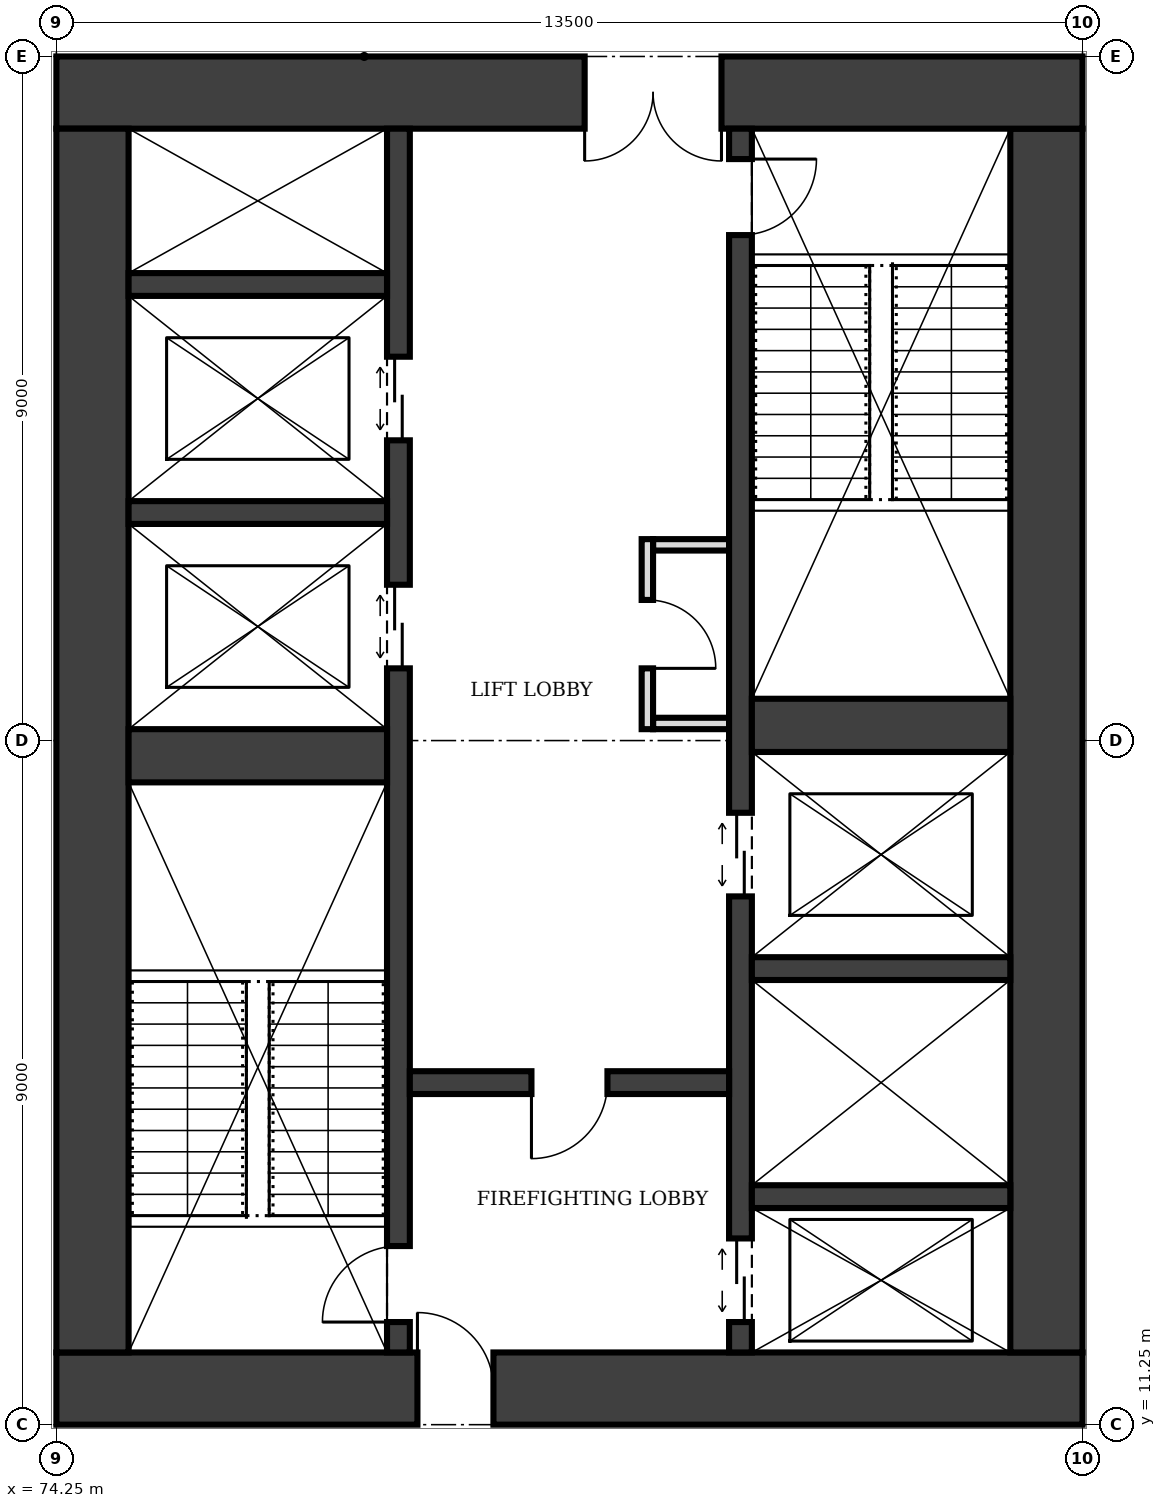
"""IFC4 building model, lengths in metres.
Left out: names, types, materials, properties, quantities, classifications, styles, units other than length and angle.
Written with IfcOpenShell. Run it as: python <this file> out.ifc"""

import sys

from ifc_helpers import new_model, si_unit, direction, frame, frame_2d, origin, place, context, subcontext, project, spatial, rectangle, extrude, element, fill, save


model = new_model("IFC4")
c1 = context("Model", 3, precision=1e-05, world=origin(), true_north=direction((0.0, 1.0)))
c2 = subcontext(c1, "Body", "Model", "MODEL_VIEW")
j1 = project(units=[si_unit("LENGTHUNIT", "METRE"), si_unit("PLANEANGLEUNIT", "RADIAN")], contexts=[c1])
p1 = place(None, origin())
s1 = spatial("IfcSite", under=j1, at=p1, CompositionType="ELEMENT")
p2 = place(p1, origin())
s2 = spatial("IfcBuilding", under=s1, at=p2, CompositionType="ELEMENT")
p3 = place(p2, frame((0.0, 0.0, 73.0)))
s3 = spatial("IfcBuildingStorey", under=s2, at=p3, CompositionType="ELEMENT", Elevation=73.0)
p4 = place(p3, frame((74.25, 11.725, 0.0), z_axis=(0.0, 0.0, 1.0), x_axis=(1.0, 0.0, 0.0)))
e1 = element("IfcWall", 1, at=p4, inside=s3, PredefinedType="SHEAR", context=c2, shape_type="SweptSolid", body=[
    extrude(rectangle(XDim=13.5, YDim=0.95, at=frame_2d((6.75, 0.0))), origin(), (0.0, 0.0, 1.0), 4.0),
])
p5 = place(p4, frame((4.75, 0.0, 0.0)))
e2 = element("IfcOpeningElement", 2, at=p5, cuts=e1, PredefinedType="OPENING", context=c2, shape_type="SweptSolid", body=[
    extrude(rectangle(XDim=1.0, YDim=2.1, at=frame_2d((0.5, 1.05))), frame((0.0, 0.485, 0.0), z_axis=(0.0, -1.0, 0.0), x_axis=(1.0, 0.0, 0.0)), (0.0, 0.0, 1.0), 0.97),
])
p6 = place(p3, frame((87.275, 12.2, 0.0), z_axis=(0.0, 0.0, 1.0), x_axis=(0.0, 1.0, 0.0)))
e3 = element("IfcWall", 3, at=p6, inside=s3, PredefinedType="SHEAR", context=c2, shape_type="SweptSolid", body=[
    extrude(rectangle(XDim=16.1, YDim=0.95, at=frame_2d((8.05, 0.0))), origin(), (0.0, 0.0, 1.0), 4.0),
])
p7 = place(p3, frame((87.75, 28.775, 0.0), z_axis=(0.0, 0.0, 1.0), x_axis=(-1.0, 0.0, 0.0)))
e4 = element("IfcWall", 4, at=p7, inside=s3, PredefinedType="SHEAR", context=c2, shape_type="SweptSolid", body=[
    extrude(rectangle(XDim=13.5, YDim=0.95, at=frame_2d((6.75, 0.0))), origin(), (0.0, 0.0, 1.0), 4.0),
])
p8 = place(p7, frame((4.75, 0.0, 0.0)))
e5 = element("IfcOpeningElement", 5, at=p8, cuts=e4, PredefinedType="OPENING", context=c2, shape_type="SweptSolid", body=[
    extrude(rectangle(XDim=1.8, YDim=2.1, at=frame_2d((0.9, 1.05))), frame((0.0, 0.485, 0.0), z_axis=(0.0, -1.0, 0.0), x_axis=(1.0, 0.0, 0.0)), (0.0, 0.0, 1.0), 0.97),
])
p9 = place(p3, frame((74.725, 28.3, 0.0), z_axis=(0.0, 0.0, 1.0), x_axis=(0.0, -1.0, 0.0)))
e6 = element("IfcWall", 6, at=p9, inside=s3, PredefinedType="SHEAR", context=c2, shape_type="SweptSolid", body=[
    extrude(rectangle(XDim=16.1, YDim=0.95, at=frame_2d((8.05, 0.0))), origin(), (0.0, 0.0, 1.0), 4.0),
])
p10 = place(p3, frame((78.75, 12.2, 0.0), z_axis=(0.0, 0.0, 1.0), x_axis=(0.0, 1.0, 0.0)))
e7 = element("IfcWall", 7, at=p10, inside=s3, PredefinedType="SHEAR", context=c2, shape_type="SweptSolid", body=[
    extrude(rectangle(XDim=16.1, YDim=0.3, at=frame_2d((8.05, 0.0))), origin(), (0.0, 0.0, 1.0), 4.0),
])
p11 = place(p10, frame((0.4, 0.0, 0.0)))
e8 = element("IfcOpeningElement", 8, at=p11, cuts=e7, PredefinedType="OPENING", context=c2, shape_type="SweptSolid", body=[
    extrude(rectangle(XDim=1.0, YDim=2.1, at=frame_2d((0.5, 1.05))), frame((0.0, 0.16, 0.0), z_axis=(0.0, -1.0, 0.0), x_axis=(1.0, 0.0, 0.0)), (0.0, 0.0, 1.0), 0.32),
])
p12 = place(p10, frame((9.0, 0.0, 0.0)))
e9 = element("IfcOpeningElement", 9, at=p12, cuts=e7, PredefinedType="OPENING", context=c2, shape_type="SweptSolid", body=[
    extrude(rectangle(XDim=1.1, YDim=2.1, at=frame_2d((0.55, 1.05))), frame((0.0, 0.16, 0.0), z_axis=(0.0, -1.0, 0.0), x_axis=(1.0, 0.0, 0.0)), (0.0, 0.0, 1.0), 0.32),
])
p13 = place(p10, frame((12.0, 0.0, 0.0)))
e10 = element("IfcOpeningElement", 10, at=p13, cuts=e7, PredefinedType="OPENING", context=c2, shape_type="SweptSolid", body=[
    extrude(rectangle(XDim=1.1, YDim=2.1, at=frame_2d((0.55, 1.05))), frame((0.0, 0.16, 0.0), z_axis=(0.0, -1.0, 0.0), x_axis=(1.0, 0.0, 0.0)), (0.0, 0.0, 1.0), 0.32),
])
p14 = place(p3, frame((83.25, 12.2, 0.0), z_axis=(0.0, 0.0, 1.0), x_axis=(0.0, 1.0, 0.0)))
e11 = element("IfcWall", 11, at=p14, inside=s3, PredefinedType="SHEAR", context=c2, shape_type="SweptSolid", body=[
    extrude(rectangle(XDim=16.1, YDim=0.3, at=frame_2d((8.05, 0.0))), origin(), (0.0, 0.0, 1.0), 4.0),
])
p15 = place(p14, frame((14.7, 0.0, 0.0)))
e12 = element("IfcOpeningElement", 12, at=p15, cuts=e11, PredefinedType="OPENING", context=c2, shape_type="SweptSolid", body=[
    extrude(rectangle(XDim=1.0, YDim=2.1, at=frame_2d((0.5, 1.05))), frame((0.0, 0.16, 0.0), z_axis=(0.0, -1.0, 0.0), x_axis=(1.0, 0.0, 0.0)), (0.0, 0.0, 1.0), 0.32),
])
p16 = place(p14, frame((0.4, 0.0, 0.0)))
e13 = element("IfcOpeningElement", 13, at=p16, cuts=e11, PredefinedType="OPENING", context=c2, shape_type="SweptSolid", body=[
    extrude(rectangle(XDim=1.1, YDim=2.1, at=frame_2d((0.55, 1.05))), frame((0.0, 0.16, 0.0), z_axis=(0.0, -1.0, 0.0), x_axis=(1.0, 0.0, 0.0)), (0.0, 0.0, 1.0), 0.32),
])
p17 = place(p14, frame((6.0, 0.0, 0.0)))
e14 = element("IfcOpeningElement", 14, at=p17, cuts=e11, PredefinedType="OPENING", context=c2, shape_type="SweptSolid", body=[
    extrude(rectangle(XDim=1.1, YDim=2.1, at=frame_2d((0.55, 1.05))), frame((0.0, 0.16, 0.0), z_axis=(0.0, -1.0, 0.0), x_axis=(1.0, 0.0, 0.0)), (0.0, 0.0, 1.0), 0.32),
])
p18 = place(p3, frame((75.2, 20.05, 0.0), z_axis=(0.0, 0.0, 1.0), x_axis=(1.0, 0.0, 0.0)))
e15 = element("IfcWall", 15, at=p18, inside=s3, PredefinedType="SHEAR", context=c2, shape_type="SweptSolid", body=[
    extrude(rectangle(XDim=3.4, YDim=0.7, at=frame_2d((1.7, 0.0))), origin(), (0.0, 0.0, 1.0), 4.0),
])
p19 = place(p3, frame((78.9, 15.75, 0.0), z_axis=(0.0, 0.0, 1.0), x_axis=(1.0, 0.0, 0.0)))
e16 = element("IfcWall", 16, at=p19, inside=s3, PredefinedType="SHEAR", context=c2, shape_type="SweptSolid", body=[
    extrude(rectangle(XDim=4.2, YDim=0.3, at=frame_2d((2.1, 0.0))), origin(), (0.0, 0.0, 1.0), 4.0),
])
p20 = place(p19, frame((1.6, 0.0, 0.0)))
e17 = element("IfcOpeningElement", 17, at=p20, cuts=e16, PredefinedType="OPENING", context=c2, shape_type="SweptSolid", body=[
    extrude(rectangle(XDim=1.0, YDim=2.1, at=frame_2d((0.5, 1.05))), frame((0.0, 0.16, 0.0), z_axis=(0.0, -1.0, 0.0), x_axis=(1.0, 0.0, 0.0)), (0.0, 0.0, 1.0), 0.32),
])
for number, where, z_axis, x_axis in (
    (18, (83.4, 14.25, 0.0), (0.0, 0.0, 1.0), (1.0, 0.0, 0.0)),
    (19, (83.4, 17.25, 0.0), (0.0, 0.0, 1.0), (1.0, 0.0, 0.0)),
):
    element("IfcWall", number, at=place(p3, frame(where, z_axis=z_axis, x_axis=x_axis)), inside=s3, PredefinedType="SHEAR", context=c2, shape_type="SweptSolid", body=[
        extrude(rectangle(XDim=3.4, YDim=0.3, at=frame_2d((1.7, 0.0))), origin(), (0.0, 0.0, 1.0), 4.0),
    ])
p21 = place(p3, frame((83.4, 20.45, 0.0), z_axis=(0.0, 0.0, 1.0), x_axis=(1.0, 0.0, 0.0)))
e20 = element("IfcWall", 20, at=p21, inside=s3, PredefinedType="SHEAR", context=c2, shape_type="SweptSolid", body=[
    extrude(rectangle(XDim=3.4, YDim=0.7, at=frame_2d((1.7, 0.0))), origin(), (0.0, 0.0, 1.0), 4.0),
])
for number, where, z_axis, x_axis in (
    (21, (75.2, 23.25, 0.0), (0.0, 0.0, 1.0), (1.0, 0.0, 0.0)),
    (22, (75.2, 26.25, 0.0), (0.0, 0.0, 1.0), (1.0, 0.0, 0.0)),
):
    element("IfcWall", number, at=place(p3, frame(where, z_axis=z_axis, x_axis=x_axis)), inside=s3, PredefinedType="SHEAR", context=c2, shape_type="SweptSolid", body=[
        extrude(rectangle(XDim=3.4, YDim=0.3, at=frame_2d((1.7, 0.0))), origin(), (0.0, 0.0, 1.0), 4.0),
    ])
p22 = place(p3, frame((82.025, 20.4, 0.0), z_axis=(0.0, 0.0, 1.0), x_axis=(0.0, 1.0, 0.0)))
e23 = element("IfcWall", 23, at=p22, inside=s3, PredefinedType="PARTITIONING", context=c2, shape_type="SweptSolid", body=[
    extrude(rectangle(XDim=2.5, YDim=0.15, at=frame_2d((1.25, 0.0))), origin(), (0.0, 0.0, 1.0), 3.75),
])
p23 = place(p22, frame((0.8, 0.0, 0.0)))
e24 = element("IfcOpeningElement", 24, at=p23, cuts=e23, PredefinedType="OPENING", context=c2, shape_type="SweptSolid", body=[
    extrude(rectangle(XDim=0.9, YDim=2.1, at=frame_2d((0.45, 1.05))), frame((0.0, 0.085, 0.0), z_axis=(0.0, -1.0, 0.0), x_axis=(1.0, 0.0, 0.0)), (0.0, 0.0, 1.0), 0.17),
])
for number, where, z_axis, x_axis in (
    (25, (82.1, 20.475, 0.0), (0.0, 0.0, 1.0), (1.0, 0.0, 0.0)),
    (26, (82.1, 22.825, 0.0), (0.0, 0.0, 1.0), (1.0, 0.0, 0.0)),
):
    element("IfcWall", number, at=place(p3, frame(where, z_axis=z_axis, x_axis=x_axis)), inside=s3, PredefinedType="PARTITIONING", context=c2, shape_type="SweptSolid", body=[
        extrude(rectangle(XDim=1.0, YDim=0.15, at=frame_2d((0.5, 0.0))), origin(), (0.0, 0.0, 1.0), 3.75),
    ])
p24 = place(p5, origin())
e27 = element("IfcDoor", 27, at=p24, inside=s3, OperationType="SINGLE_SWING_LEFT", PredefinedType="DOOR", context=c2, shape_type="SweptSolid", body=[
    extrude(rectangle(XDim=1.0, YDim=2.1, at=frame_2d((0.5, 1.05))), frame((0.0, 0.025, 0.0), z_axis=(0.0, -1.0, 0.0), x_axis=(1.0, 0.0, 0.0)), (0.0, 0.0, 1.0), 0.05),
])
fill(e2, e27)
p25 = place(p8, origin())
e28 = element("IfcDoor", 28, at=p25, inside=s3, OperationType="DOUBLE_DOOR_SINGLE_SWING", PredefinedType="DOOR", context=c2, shape_type="SweptSolid", body=[
    extrude(rectangle(XDim=1.8, YDim=2.1, at=frame_2d((0.9, 1.05))), frame((0.0, 0.025, 0.0), z_axis=(0.0, -1.0, 0.0), x_axis=(1.0, 0.0, 0.0)), (0.0, 0.0, 1.0), 0.05),
])
fill(e5, e28)
p26 = place(p20, frame((1.0, 0.0, 0.0), z_axis=(0.0, 0.0, 1.0), x_axis=(-1.0, 0.0, 0.0)))
e29 = element("IfcDoor", 29, at=p26, inside=s3, OperationType="SINGLE_SWING_RIGHT", PredefinedType="DOOR", context=c2, shape_type="SweptSolid", body=[
    extrude(rectangle(XDim=1.0, YDim=2.1, at=frame_2d((0.5, 1.05))), frame((0.0, 0.025, 0.0), z_axis=(0.0, -1.0, 0.0), x_axis=(1.0, 0.0, 0.0)), (0.0, 0.0, 1.0), 0.05),
])
fill(e17, e29)
p27 = place(p11, origin())
e30 = element("IfcDoor", 30, at=p27, inside=s3, OperationType="SINGLE_SWING_LEFT", PredefinedType="DOOR", context=c2, shape_type="SweptSolid", body=[
    extrude(rectangle(XDim=1.0, YDim=2.1, at=frame_2d((0.5, 1.05))), frame((0.0, 0.025, 0.0), z_axis=(0.0, -1.0, 0.0), x_axis=(1.0, 0.0, 0.0)), (0.0, 0.0, 1.0), 0.05),
])
fill(e8, e30)
p28 = place(p15, frame((1.0, 0.0, 0.0), z_axis=(0.0, 0.0, 1.0), x_axis=(-1.0, 0.0, 0.0)))
e31 = element("IfcDoor", 31, at=p28, inside=s3, OperationType="SINGLE_SWING_LEFT", PredefinedType="DOOR", context=c2, shape_type="SweptSolid", body=[
    extrude(rectangle(XDim=1.0, YDim=2.1, at=frame_2d((0.5, 1.05))), frame((0.0, 0.025, 0.0), z_axis=(0.0, -1.0, 0.0), x_axis=(1.0, 0.0, 0.0)), (0.0, 0.0, 1.0), 0.05),
])
fill(e12, e31)
p29 = place(p16, origin())
e32 = element("IfcDoor", 32, at=p29, inside=s3, OperationType="DOUBLE_DOOR_SLIDING", PredefinedType="DOOR", context=c2, shape_type="SweptSolid", body=[
    extrude(rectangle(XDim=1.1, YDim=2.1, at=frame_2d((0.55, 1.05))), frame((0.0, 0.025, 0.0), z_axis=(0.0, -1.0, 0.0), x_axis=(1.0, 0.0, 0.0)), (0.0, 0.0, 1.0), 0.05),
])
fill(e13, e32)
p30 = place(p12, origin())
e33 = element("IfcDoor", 33, at=p30, inside=s3, OperationType="DOUBLE_DOOR_SLIDING", PredefinedType="DOOR", context=c2, shape_type="SweptSolid", body=[
    extrude(rectangle(XDim=1.1, YDim=2.1, at=frame_2d((0.55, 1.05))), frame((0.0, 0.025, 0.0), z_axis=(0.0, -1.0, 0.0), x_axis=(1.0, 0.0, 0.0)), (0.0, 0.0, 1.0), 0.05),
])
fill(e9, e33)
p31 = place(p13, origin())
e34 = element("IfcDoor", 34, at=p31, inside=s3, OperationType="DOUBLE_DOOR_SLIDING", PredefinedType="DOOR", context=c2, shape_type="SweptSolid", body=[
    extrude(rectangle(XDim=1.1, YDim=2.1, at=frame_2d((0.55, 1.05))), frame((0.0, 0.025, 0.0), z_axis=(0.0, -1.0, 0.0), x_axis=(1.0, 0.0, 0.0)), (0.0, 0.0, 1.0), 0.05),
])
fill(e10, e34)
p32 = place(p17, origin())
e35 = element("IfcDoor", 35, at=p32, inside=s3, OperationType="DOUBLE_DOOR_SLIDING", PredefinedType="DOOR", context=c2, shape_type="SweptSolid", body=[
    extrude(rectangle(XDim=1.1, YDim=2.1, at=frame_2d((0.55, 1.05))), frame((0.0, 0.025, 0.0), z_axis=(0.0, -1.0, 0.0), x_axis=(1.0, 0.0, 0.0)), (0.0, 0.0, 1.0), 0.05),
])
fill(e14, e35)
p33 = place(p23, frame((0.9, 0.0, 0.0), z_axis=(0.0, 0.0, 1.0), x_axis=(-1.0, 0.0, 0.0)))
e36 = element("IfcDoor", 36, at=p33, inside=s3, OperationType="SINGLE_SWING_RIGHT", PredefinedType="DOOR", context=c2, shape_type="SweptSolid", body=[
    extrude(rectangle(XDim=0.9, YDim=2.1, at=frame_2d((0.45, 1.05))), frame((0.0, 0.025, 0.0), z_axis=(0.0, -1.0, 0.0), x_axis=(1.0, 0.0, 0.0)), (0.0, 0.0, 1.0), 0.05),
])
fill(e24, e36)
save(model, sys.argv[1])
